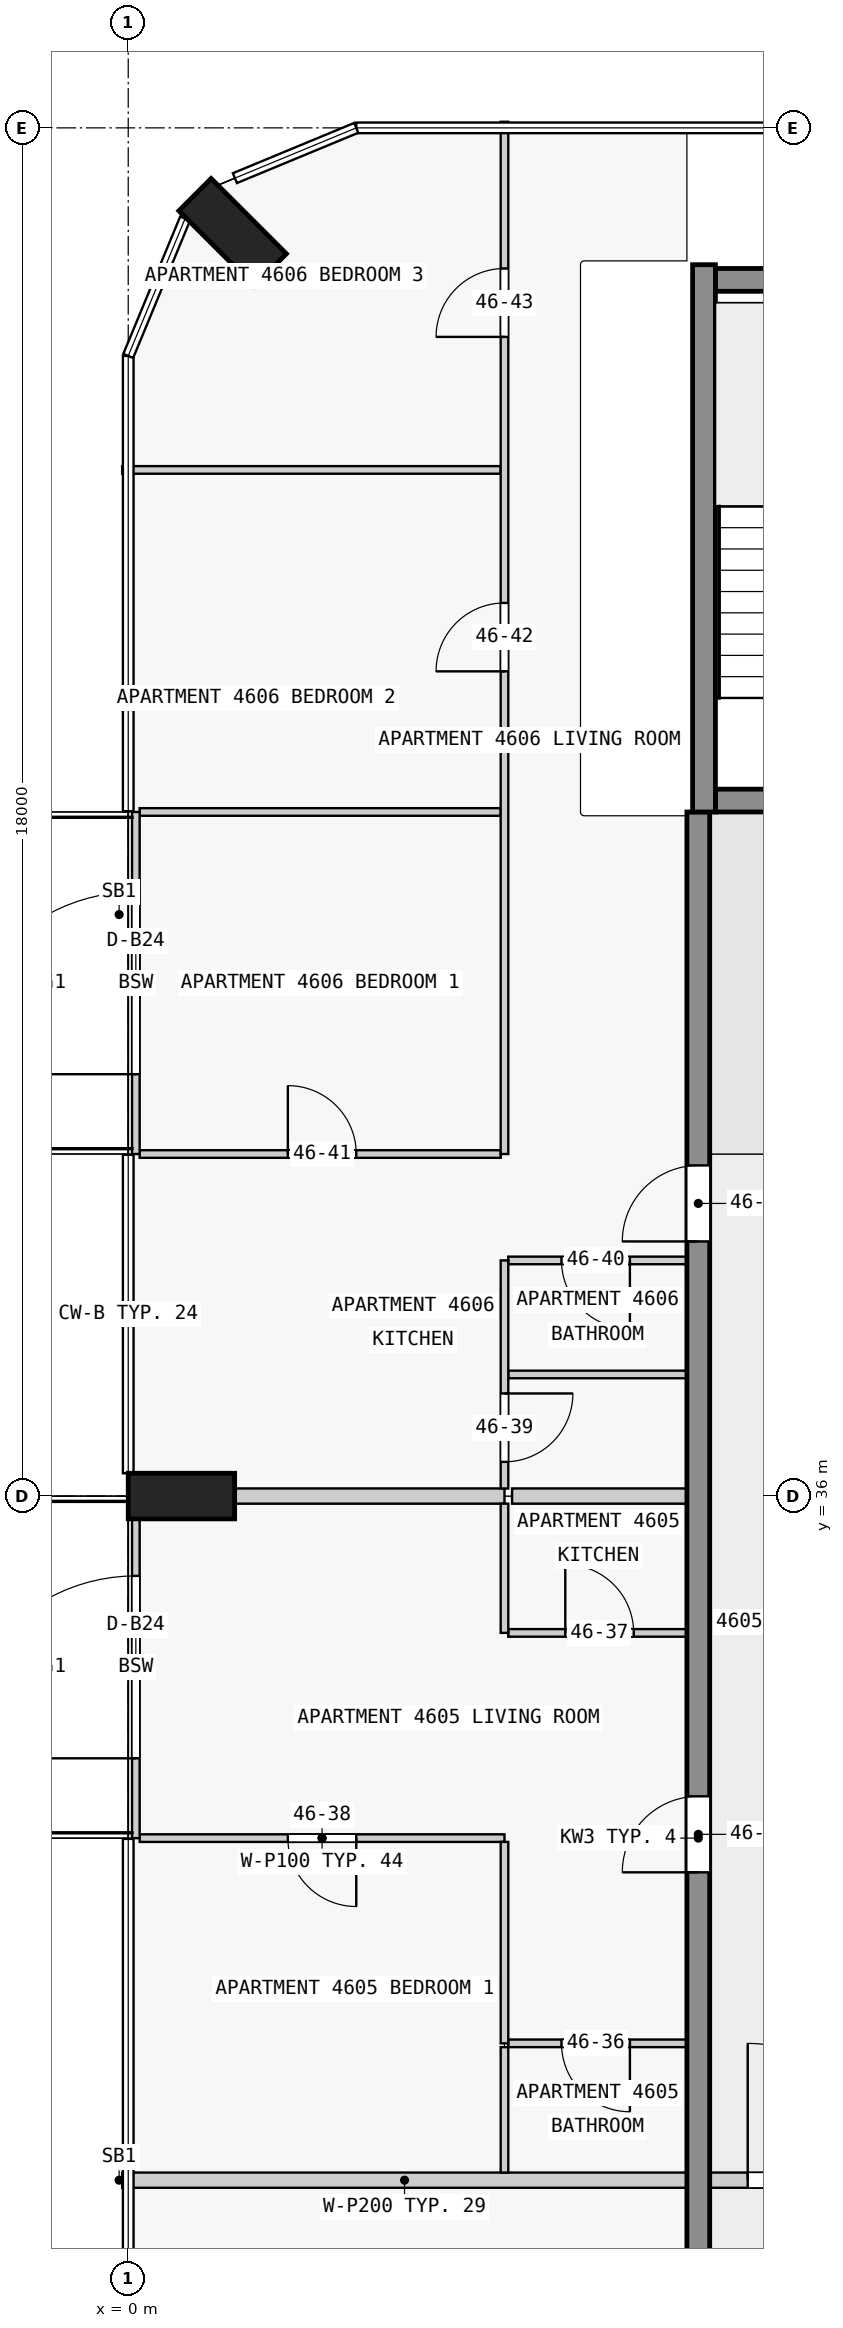
"""IFC4 building model, lengths in metres.
Left out: names, types, materials, properties, quantities, classifications, styles, units other than length and angle.
Written with IfcOpenShell. Run it as: python <this file> out.ifc"""

import sys

from ifc_helpers import new_model, si_unit, direction, frame, frame_2d, origin, origin_2d, place, context, subcontext, project, spatial, rectangle, extrude, element, fill, save


model = new_model("IFC4")
c1 = context("Model", 3, precision=1e-05, world=origin(), true_north=direction((0.0, 1.0)))
c2 = subcontext(c1, "Body", "Model", "MODEL_VIEW")
j1 = project(units=[si_unit("LENGTHUNIT", "METRE"), si_unit("PLANEANGLEUNIT", "RADIAN")], contexts=[c1])
p1 = place(None, origin())
s1 = spatial("IfcSite", under=j1, at=p1, CompositionType="ELEMENT")
p2 = place(p1, origin())
s2 = spatial("IfcBuilding", under=s1, at=p2, CompositionType="ELEMENT")
p3 = place(p2, frame((0.0, 0.0, 177.9)))
s3 = spatial("IfcBuildingStorey", under=s2, at=p3, CompositionType="ELEMENT", Elevation=177.9)
for number, where, z_axis, x_axis in (
    (1, (1.374, 52.626, 0.0), (0.0, 0.0, 1.0), (0.707, 0.707, 0.0)),
    (2, (0.7, 36.0, 0.0), (0.0, 0.0, 1.0), (0.0, 1.0, 0.0)),
):
    element("IfcColumn", number, at=place(p3, frame(where, z_axis=z_axis, x_axis=x_axis)), inside=s3, PredefinedType="COLUMN", context=c2, shape_type="SweptSolid", body=[
        extrude(rectangle(XDim=0.6, YDim=1.4, at=origin_2d()), origin(), (0.0, 0.0, 1.0), 3.5),
    ])
p4 = place(p3, frame((7.725, 45.15, 0.0), z_axis=(0.0, 0.0, 1.0), x_axis=(1.0, 0.0, 0.0)))
e3 = element("IfcWall", 3, at=p4, inside=s3, PredefinedType="SHEAR", context=c2, shape_type="SweptSolid", body=[
    extrude(rectangle(XDim=2.55, YDim=0.3, at=frame_2d((1.275, 0.0))), origin(), (0.0, 0.0, 1.0), 3.5),
])
p5 = place(p4, frame((0.725, 0.0, 0.0)))
e4 = element("IfcOpeningElement", 4, at=p5, cuts=e3, PredefinedType="OPENING", context=c2, shape_type="SweptSolid", body=[
    extrude(rectangle(XDim=1.1, YDim=2.1, at=frame_2d((0.55, 1.05))), frame((0.0, 0.16, 0.0), z_axis=(0.0, -1.0, 0.0), x_axis=(1.0, 0.0, 0.0)), (0.0, 0.0, 1.0), 0.32),
])
p6 = place(p3, frame((7.725, 52.0, 0.0), z_axis=(0.0, 0.0, 1.0), x_axis=(1.0, 0.0, 0.0)))
e5 = element("IfcWall", 5, at=p6, inside=s3, PredefinedType="SHEAR", context=c2, shape_type="SweptSolid", body=[
    extrude(rectangle(XDim=2.55, YDim=0.3, at=frame_2d((1.275, 0.0))), origin(), (0.0, 0.0, 1.0), 3.5),
])
p7 = place(p3, frame((7.575, 45.0, 0.0), z_axis=(0.0, 0.0, 1.0), x_axis=(0.0, 1.0, 0.0)))
e6 = element("IfcWall", 6, at=p7, inside=s3, PredefinedType="SHEAR", context=c2, shape_type="SweptSolid", body=[
    extrude(rectangle(XDim=7.2, YDim=0.3, at=frame_2d((3.6, 0.0))), origin(), (0.0, 0.0, 1.0), 3.5),
])
p8 = place(p3, frame((7.5, 18.0, 0.0), z_axis=(0.0, 0.0, 1.0), x_axis=(0.0, 1.0, 0.0)))
e7 = element("IfcWall", 7, at=p8, inside=s3, PredefinedType="SHEAR", context=c2, shape_type="SweptSolid", body=[
    extrude(rectangle(XDim=27.0, YDim=0.3, at=frame_2d((13.5, 0.0))), origin(), (0.0, 0.0, 1.0), 3.25),
])
p9 = place(p8, frame((1.75, 0.0, 0.0)))
e8 = element("IfcOpeningElement", 8, at=p9, cuts=e7, PredefinedType="OPENING", context=c2, shape_type="SweptSolid", body=[
    extrude(rectangle(XDim=1.0, YDim=2.1, at=frame_2d((0.5, 1.05))), frame((0.0, 0.16, 0.0), z_axis=(0.0, -1.0, 0.0), x_axis=(1.0, 0.0, 0.0)), (0.0, 0.0, 1.0), 0.32),
])
p10 = place(p8, frame((5.85, 0.0, 0.0)))
e9 = element("IfcOpeningElement", 9, at=p10, cuts=e7, PredefinedType="OPENING", context=c2, shape_type="SweptSolid", body=[
    extrude(rectangle(XDim=1.8, YDim=2.1, at=frame_2d((0.9, 1.05))), frame((0.0, 0.16, 0.0), z_axis=(0.0, -1.0, 0.0), x_axis=(1.0, 0.0, 0.0)), (0.0, 0.0, 1.0), 0.32),
])
p11 = place(p8, frame((13.05, 0.0, 0.0)))
e10 = element("IfcOpeningElement", 10, at=p11, cuts=e7, PredefinedType="OPENING", context=c2, shape_type="SweptSolid", body=[
    extrude(rectangle(XDim=1.0, YDim=2.1, at=frame_2d((0.5, 1.05))), frame((0.0, 0.16, 0.0), z_axis=(0.0, -1.0, 0.0), x_axis=(1.0, 0.0, 0.0)), (0.0, 0.0, 1.0), 0.32),
])
p12 = place(p8, frame((21.35, 0.0, 0.0)))
e11 = element("IfcOpeningElement", 11, at=p12, cuts=e7, PredefinedType="OPENING", context=c2, shape_type="SweptSolid", body=[
    extrude(rectangle(XDim=1.0, YDim=2.1, at=frame_2d((0.5, 1.05))), frame((0.0, 0.16, 0.0), z_axis=(0.0, -1.0, 0.0), x_axis=(1.0, 0.0, 0.0)), (0.0, 0.0, 1.0), 0.32),
])
p13 = place(p3, frame((0.1, 31.5, 0.0), z_axis=(0.0, 0.0, 1.0), x_axis=(0.0, 1.0, 0.0)))
e12 = element("IfcWall", 12, at=p13, inside=s3, PredefinedType="STANDARD", context=c2, shape_type="SweptSolid", body=[
    extrude(rectangle(XDim=4.5, YDim=0.1, at=frame_2d((2.25, 0.0))), origin(), (0.0, 0.0, 1.0), 3.25),
])
p14 = place(p13, frame((1.05, 0.0, 0.0)))
e13 = element("IfcOpeningElement", 13, at=p14, cuts=e12, PredefinedType="OPENING", context=c2, shape_type="SweptSolid", body=[
    extrude(rectangle(XDim=2.4, YDim=2.4, at=frame_2d((1.2, 1.2))), frame((0.0, 0.06, 0.0), z_axis=(0.0, -1.0, 0.0), x_axis=(1.0, 0.0, 0.0)), (0.0, 0.0, 1.0), 0.12),
])
p15 = place(p3, frame((0.1, 40.5, 0.0), z_axis=(0.0, 0.0, 1.0), x_axis=(0.0, 1.0, 0.0)))
e14 = element("IfcWall", 14, at=p15, inside=s3, PredefinedType="STANDARD", context=c2, shape_type="SweptSolid", body=[
    extrude(rectangle(XDim=4.5, YDim=0.1, at=frame_2d((2.25, 0.0))), origin(), (0.0, 0.0, 1.0), 3.25),
])
p16 = place(p15, frame((1.05, 0.0, 0.0)))
e15 = element("IfcOpeningElement", 15, at=p16, cuts=e14, PredefinedType="OPENING", context=c2, shape_type="SweptSolid", body=[
    extrude(rectangle(XDim=2.4, YDim=2.4, at=frame_2d((1.2, 1.2))), frame((0.0, 0.06, 0.0), z_axis=(0.0, -1.0, 0.0), x_axis=(1.0, 0.0, 0.0)), (0.0, 0.0, 1.0), 0.12),
])
p17 = place(p3, frame((7.35, 27.0, 0.0), z_axis=(0.0, 0.0, 1.0), x_axis=(-1.0, 0.0, 0.0)))
e16 = element("IfcWall", 16, at=p17, inside=s3, PredefinedType="PARTITIONING", context=c2, shape_type="SweptSolid", body=[
    extrude(rectangle(XDim=7.43, YDim=0.2, at=frame_2d((3.715, 0.0))), origin(), (0.0, 0.0, 1.0), 3.25),
])
p18 = place(p3, frame((7.35, 28.8, 0.0), z_axis=(0.0, 0.0, 1.0), x_axis=(-1.0, 0.0, 0.0)))
e17 = element("IfcWall", 17, at=p18, inside=s3, PredefinedType="PARTITIONING", context=c2, shape_type="SweptSolid", body=[
    extrude(rectangle(XDim=2.35, YDim=0.1, at=frame_2d((1.175, 0.0))), origin(), (0.0, 0.0, 1.0), 3.25),
])
p19 = place(p18, frame((0.75, 0.0, 0.0)))
e18 = element("IfcOpeningElement", 18, at=p19, cuts=e17, PredefinedType="OPENING", context=c2, shape_type="SweptSolid", body=[
    extrude(rectangle(XDim=0.9, YDim=2.1, at=frame_2d((0.45, 1.05))), frame((0.0, 0.06, 0.0), z_axis=(0.0, -1.0, 0.0), x_axis=(1.0, 0.0, 0.0)), (0.0, 0.0, 1.0), 0.12),
])
p20 = place(p3, frame((4.95, 31.5, 0.0), z_axis=(0.0, 0.0, 1.0), x_axis=(-1.0, 0.0, 0.0)))
e19 = element("IfcWall", 19, at=p20, inside=s3, PredefinedType="PARTITIONING", context=c2, shape_type="SweptSolid", body=[
    extrude(rectangle(XDim=4.8, YDim=0.1, at=frame_2d((2.4, 0.0))), origin(), (0.0, 0.0, 1.0), 3.25),
])
p21 = place(p20, frame((1.95, 0.0, 0.0)))
e20 = element("IfcOpeningElement", 20, at=p21, cuts=e19, PredefinedType="OPENING", context=c2, shape_type="SweptSolid", body=[
    extrude(rectangle(XDim=0.9, YDim=2.1, at=frame_2d((0.45, 1.05))), frame((0.0, 0.06, 0.0), z_axis=(0.0, -1.0, 0.0), x_axis=(1.0, 0.0, 0.0)), (0.0, 0.0, 1.0), 0.12),
])
p22 = place(p3, frame((5.0, 34.2, 0.0), z_axis=(0.0, 0.0, 1.0), x_axis=(1.0, 0.0, 0.0)))
e21 = element("IfcWall", 21, at=p22, inside=s3, PredefinedType="PARTITIONING", context=c2, shape_type="SweptSolid", body=[
    extrude(rectangle(XDim=2.35, YDim=0.1, at=frame_2d((1.175, 0.0))), origin(), (0.0, 0.0, 1.0), 3.25),
])
p23 = place(p22, frame((0.75, 0.0, 0.0)))
e22 = element("IfcOpeningElement", 22, at=p23, cuts=e21, PredefinedType="OPENING", context=c2, shape_type="SweptSolid", body=[
    extrude(rectangle(XDim=0.9, YDim=2.1, at=frame_2d((0.45, 1.05))), frame((0.0, 0.06, 0.0), z_axis=(0.0, -1.0, 0.0), x_axis=(1.0, 0.0, 0.0)), (0.0, 0.0, 1.0), 0.12),
])
p24 = place(p3, frame((7.35, 36.0, 0.0), z_axis=(0.0, 0.0, 1.0), x_axis=(-1.0, 0.0, 0.0)))
e23 = element("IfcWall", 23, at=p24, inside=s3, PredefinedType="PARTITIONING", context=c2, shape_type="SweptSolid", body=[
    extrude(rectangle(XDim=2.3, YDim=0.2, at=frame_2d((1.15, 0.0))), origin(), (0.0, 0.0, 1.0), 3.25),
])
p25 = place(p3, frame((1.4, 36.0, 0.0), z_axis=(0.0, 0.0, 1.0), x_axis=(1.0, 0.0, 0.0)))
e24 = element("IfcWall", 24, at=p25, inside=s3, PredefinedType="PARTITIONING", context=c2, shape_type="SweptSolid", body=[
    extrude(rectangle(XDim=3.55, YDim=0.2, at=frame_2d((1.775, 0.0))), origin(), (0.0, 0.0, 1.0), 3.25),
])
p26 = place(p3, frame((7.35, 37.6, 0.0), z_axis=(0.0, 0.0, 1.0), x_axis=(-1.0, 0.0, 0.0)))
e25 = element("IfcWall", 25, at=p26, inside=s3, PredefinedType="PARTITIONING", context=c2, shape_type="SweptSolid", body=[
    extrude(rectangle(XDim=2.35, YDim=0.1, at=frame_2d((1.175, 0.0))), origin(), (0.0, 0.0, 1.0), 3.25),
])
p27 = place(p3, frame((7.35, 39.1, 0.0), z_axis=(0.0, 0.0, 1.0), x_axis=(-1.0, 0.0, 0.0)))
e26 = element("IfcWall", 26, at=p27, inside=s3, PredefinedType="PARTITIONING", context=c2, shape_type="SweptSolid", body=[
    extrude(rectangle(XDim=2.35, YDim=0.1, at=frame_2d((1.175, 0.0))), origin(), (0.0, 0.0, 1.0), 3.25),
])
p28 = place(p27, frame((0.75, 0.0, 0.0)))
e27 = element("IfcOpeningElement", 27, at=p28, cuts=e26, PredefinedType="OPENING", context=c2, shape_type="SweptSolid", body=[
    extrude(rectangle(XDim=0.9, YDim=2.1, at=frame_2d((0.45, 1.05))), frame((0.0, 0.06, 0.0), z_axis=(0.0, -1.0, 0.0), x_axis=(1.0, 0.0, 0.0)), (0.0, 0.0, 1.0), 0.12),
])
p29 = place(p3, frame((0.15, 40.5, 0.0), z_axis=(0.0, 0.0, 1.0), x_axis=(1.0, 0.0, 0.0)))
e28 = element("IfcWall", 28, at=p29, inside=s3, PredefinedType="PARTITIONING", context=c2, shape_type="SweptSolid", body=[
    extrude(rectangle(XDim=4.75, YDim=0.1, at=frame_2d((2.375, 0.0))), origin(), (0.0, 0.0, 1.0), 3.25),
])
p30 = place(p29, frame((1.95, 0.0, 0.0)))
e29 = element("IfcOpeningElement", 29, at=p30, cuts=e28, PredefinedType="OPENING", context=c2, shape_type="SweptSolid", body=[
    extrude(rectangle(XDim=0.9, YDim=2.1, at=frame_2d((0.45, 1.05))), frame((0.0, 0.06, 0.0), z_axis=(0.0, -1.0, 0.0), x_axis=(1.0, 0.0, 0.0)), (0.0, 0.0, 1.0), 0.12),
])
p31 = place(p3, frame((4.9, 45.0, 0.0), z_axis=(0.0, 0.0, 1.0), x_axis=(-1.0, 0.0, 0.0)))
e30 = element("IfcWall", 30, at=p31, inside=s3, PredefinedType="PARTITIONING", context=c2, shape_type="SweptSolid", body=[
    extrude(rectangle(XDim=4.75, YDim=0.1, at=frame_2d((2.375, 0.0))), origin(), (0.0, 0.0, 1.0), 3.25),
])
p32 = place(p3, frame((4.9, 49.5, 0.0), z_axis=(0.0, 0.0, 1.0), x_axis=(-1.0, 0.0, 0.0)))
e31 = element("IfcWall", 31, at=p32, inside=s3, PredefinedType="PARTITIONING", context=c2, shape_type="SweptSolid", body=[
    extrude(rectangle(XDim=4.98, YDim=0.1, at=frame_2d((2.49, 0.0))), origin(), (0.0, 0.0, 1.0), 3.25),
])
p33 = place(p3, frame((4.95, 28.75, 0.0), z_axis=(0.0, 0.0, 1.0), x_axis=(0.0, -1.0, 0.0)))
e32 = element("IfcWall", 32, at=p33, inside=s3, PredefinedType="PARTITIONING", context=c2, shape_type="SweptSolid", body=[
    extrude(rectangle(XDim=1.65, YDim=0.1, at=frame_2d((0.825, 0.0))), origin(), (0.0, 0.0, 1.0), 3.25),
])
p34 = place(p3, frame((4.95, 35.9, 0.0), z_axis=(0.0, 0.0, 1.0), x_axis=(0.0, -1.0, 0.0)))
e33 = element("IfcWall", 33, at=p34, inside=s3, PredefinedType="PARTITIONING", context=c2, shape_type="SweptSolid", body=[
    extrude(rectangle(XDim=1.7, YDim=0.1, at=frame_2d((0.85, 0.0))), origin(), (0.0, 0.0, 1.0), 3.25),
])
p35 = place(p3, frame((4.95, 39.1, 0.0), z_axis=(0.0, 0.0, 1.0), x_axis=(0.0, -1.0, 0.0)))
e34 = element("IfcWall", 34, at=p35, inside=s3, PredefinedType="PARTITIONING", context=c2, shape_type="SweptSolid", body=[
    extrude(rectangle(XDim=3.0, YDim=0.1, at=frame_2d((1.5, 0.0))), origin(), (0.0, 0.0, 1.0), 3.25),
])
p36 = place(p35, frame((1.75, 0.0, 0.0)))
e35 = element("IfcOpeningElement", 35, at=p36, cuts=e34, PredefinedType="OPENING", context=c2, shape_type="SweptSolid", body=[
    extrude(rectangle(XDim=0.9, YDim=2.1, at=frame_2d((0.45, 1.05))), frame((0.0, 0.06, 0.0), z_axis=(0.0, -1.0, 0.0), x_axis=(1.0, 0.0, 0.0)), (0.0, 0.0, 1.0), 0.12),
])
p37 = place(p3, frame((4.95, 28.8, 0.0), z_axis=(0.0, 0.0, 1.0), x_axis=(0.0, 1.0, 0.0)))
e36 = element("IfcWall", 36, at=p37, inside=s3, PredefinedType="PARTITIONING", context=c2, shape_type="SweptSolid", body=[
    extrude(rectangle(XDim=2.65, YDim=0.1, at=frame_2d((1.325, 0.0))), origin(), (0.0, 0.0, 1.0), 3.25),
])
p38 = place(p3, frame((4.95, 40.5, 0.0), z_axis=(0.0, 0.0, 1.0), x_axis=(0.0, 1.0, 0.0)))
e37 = element("IfcWall", 37, at=p38, inside=s3, PredefinedType="PARTITIONING", context=c2, shape_type="SweptSolid", body=[
    extrude(rectangle(XDim=13.58, YDim=0.1, at=frame_2d((6.79, 0.0))), origin(), (0.0, 0.0, 1.0), 3.25),
])
p39 = place(p38, frame((6.35, 0.0, 0.0)))
e38 = element("IfcOpeningElement", 38, at=p39, cuts=e37, PredefinedType="OPENING", context=c2, shape_type="SweptSolid", body=[
    extrude(rectangle(XDim=0.9, YDim=2.1, at=frame_2d((0.45, 1.05))), frame((0.0, 0.06, 0.0), z_axis=(0.0, -1.0, 0.0), x_axis=(1.0, 0.0, 0.0)), (0.0, 0.0, 1.0), 0.12),
])
p40 = place(p38, frame((10.75, 0.0, 0.0)))
e39 = element("IfcOpeningElement", 39, at=p40, cuts=e37, PredefinedType="OPENING", context=c2, shape_type="SweptSolid", body=[
    extrude(rectangle(XDim=0.9, YDim=2.1, at=frame_2d((0.45, 1.05))), frame((0.0, 0.06, 0.0), z_axis=(0.0, -1.0, 0.0), x_axis=(1.0, 0.0, 0.0)), (0.0, 0.0, 1.0), 0.12),
])
p41 = place(p3, frame((7.45, 27.0, 0.0), z_axis=(0.0, 0.0, 1.0), x_axis=(1.0, 0.0, 0.0)))
e40 = element("IfcWall", 40, at=p41, inside=s3, PredefinedType="PARTITIONING", context=c2, shape_type="SweptSolid", body=[
    extrude(rectangle(XDim=3.2, YDim=0.2, at=frame_2d((1.6, 0.0))), origin(), (0.0, 0.0, 1.0), 3.25),
])
p42 = place(p41, frame((0.7, 0.0, 0.0)))
e41 = element("IfcOpeningElement", 41, at=p42, cuts=e40, PredefinedType="OPENING", context=c2, shape_type="SweptSolid", body=[
    extrude(rectangle(XDim=1.8, YDim=2.1, at=frame_2d((0.9, 1.05))), frame((0.0, 0.11, 0.0), z_axis=(0.0, -1.0, 0.0), x_axis=(1.0, 0.0, 0.0)), (0.0, 0.0, 1.0), 0.22),
])
p43 = place(p14, origin())
e42 = element("IfcDoor", 42, at=p43, inside=s3, OperationType="SINGLE_SWING_LEFT", PredefinedType="DOOR", context=c2, shape_type="SweptSolid", body=[
    extrude(rectangle(XDim=2.4, YDim=2.4, at=frame_2d((1.2, 1.2))), frame((0.0, 0.025, 0.0), z_axis=(0.0, -1.0, 0.0), x_axis=(1.0, 0.0, 0.0)), (0.0, 0.0, 1.0), 0.05),
])
fill(e13, e42)
p44 = place(p16, origin())
e43 = element("IfcDoor", 43, at=p44, inside=s3, OperationType="SINGLE_SWING_LEFT", PredefinedType="DOOR", context=c2, shape_type="SweptSolid", body=[
    extrude(rectangle(XDim=2.4, YDim=2.4, at=frame_2d((1.2, 1.2))), frame((0.0, 0.025, 0.0), z_axis=(0.0, -1.0, 0.0), x_axis=(1.0, 0.0, 0.0)), (0.0, 0.0, 1.0), 0.05),
])
fill(e15, e43)
p45 = place(p11, origin())
e44 = element("IfcDoor", 44, at=p45, inside=s3, OperationType="SINGLE_SWING_RIGHT", PredefinedType="DOOR", context=c2, shape_type="SweptSolid", body=[
    extrude(rectangle(XDim=1.0, YDim=2.1, at=frame_2d((0.5, 1.05))), frame((0.0, 0.025, 0.0), z_axis=(0.0, -1.0, 0.0), x_axis=(1.0, 0.0, 0.0)), (0.0, 0.0, 1.0), 0.05),
])
fill(e10, e44)
p46 = place(p12, origin())
e45 = element("IfcDoor", 45, at=p46, inside=s3, OperationType="SINGLE_SWING_RIGHT", PredefinedType="DOOR", context=c2, shape_type="SweptSolid", body=[
    extrude(rectangle(XDim=1.0, YDim=2.1, at=frame_2d((0.5, 1.05))), frame((0.0, 0.025, 0.0), z_axis=(0.0, -1.0, 0.0), x_axis=(1.0, 0.0, 0.0)), (0.0, 0.0, 1.0), 0.05),
])
fill(e11, e45)
p47 = place(p42, origin())
e46 = element("IfcDoor", 46, at=p47, inside=s3, OperationType="SINGLE_SWING_LEFT", PredefinedType="DOOR", context=c2, shape_type="SweptSolid", body=[
    extrude(rectangle(XDim=1.8, YDim=2.1, at=frame_2d((0.9, 1.05))), frame((0.0, 0.025, 0.0), z_axis=(0.0, -1.0, 0.0), x_axis=(1.0, 0.0, 0.0)), (0.0, 0.0, 1.0), 0.05),
])
fill(e41, e46)
p48 = place(p19, origin())
e47 = element("IfcDoor", 47, at=p48, inside=s3, OperationType="SINGLE_SWING_RIGHT", PredefinedType="DOOR", context=c2, shape_type="SweptSolid", body=[
    extrude(rectangle(XDim=0.9, YDim=2.1, at=frame_2d((0.45, 1.05))), frame((0.0, 0.025, 0.0), z_axis=(0.0, -1.0, 0.0), x_axis=(1.0, 0.0, 0.0)), (0.0, 0.0, 1.0), 0.05),
])
fill(e18, e47)
p49 = place(p23, origin())
e48 = element("IfcDoor", 48, at=p49, inside=s3, OperationType="SINGLE_SWING_RIGHT", PredefinedType="DOOR", context=c2, shape_type="SweptSolid", body=[
    extrude(rectangle(XDim=0.9, YDim=2.1, at=frame_2d((0.45, 1.05))), frame((0.0, 0.025, 0.0), z_axis=(0.0, -1.0, 0.0), x_axis=(1.0, 0.0, 0.0)), (0.0, 0.0, 1.0), 0.05),
])
fill(e22, e48)
p50 = place(p21, origin())
e49 = element("IfcDoor", 49, at=p50, inside=s3, OperationType="SINGLE_SWING_LEFT", PredefinedType="DOOR", context=c2, shape_type="SweptSolid", body=[
    extrude(rectangle(XDim=0.9, YDim=2.1, at=frame_2d((0.45, 1.05))), frame((0.0, 0.025, 0.0), z_axis=(0.0, -1.0, 0.0), x_axis=(1.0, 0.0, 0.0)), (0.0, 0.0, 1.0), 0.05),
])
fill(e20, e49)
p51 = place(p36, origin())
e50 = element("IfcDoor", 50, at=p51, inside=s3, OperationType="SINGLE_SWING_RIGHT", PredefinedType="DOOR", context=c2, shape_type="SweptSolid", body=[
    extrude(rectangle(XDim=0.9, YDim=2.1, at=frame_2d((0.45, 1.05))), frame((0.0, 0.025, 0.0), z_axis=(0.0, -1.0, 0.0), x_axis=(1.0, 0.0, 0.0)), (0.0, 0.0, 1.0), 0.05),
])
fill(e35, e50)
p52 = place(p28, origin())
e51 = element("IfcDoor", 51, at=p52, inside=s3, OperationType="SINGLE_SWING_RIGHT", PredefinedType="DOOR", context=c2, shape_type="SweptSolid", body=[
    extrude(rectangle(XDim=0.9, YDim=2.1, at=frame_2d((0.45, 1.05))), frame((0.0, 0.025, 0.0), z_axis=(0.0, -1.0, 0.0), x_axis=(1.0, 0.0, 0.0)), (0.0, 0.0, 1.0), 0.05),
])
fill(e27, e51)
p53 = place(p30, origin())
e52 = element("IfcDoor", 52, at=p53, inside=s3, OperationType="SINGLE_SWING_RIGHT", PredefinedType="DOOR", context=c2, shape_type="SweptSolid", body=[
    extrude(rectangle(XDim=0.9, YDim=2.1, at=frame_2d((0.45, 1.05))), frame((0.0, 0.025, 0.0), z_axis=(0.0, -1.0, 0.0), x_axis=(1.0, 0.0, 0.0)), (0.0, 0.0, 1.0), 0.05),
])
fill(e29, e52)
p54 = place(p39, origin())
e53 = element("IfcDoor", 53, at=p54, inside=s3, OperationType="SINGLE_SWING_RIGHT", PredefinedType="DOOR", context=c2, shape_type="SweptSolid", body=[
    extrude(rectangle(XDim=0.9, YDim=2.1, at=frame_2d((0.45, 1.05))), frame((0.0, 0.025, 0.0), z_axis=(0.0, -1.0, 0.0), x_axis=(1.0, 0.0, 0.0)), (0.0, 0.0, 1.0), 0.05),
])
fill(e38, e53)
p55 = place(p40, origin())
e54 = element("IfcDoor", 54, at=p55, inside=s3, OperationType="SINGLE_SWING_RIGHT", PredefinedType="DOOR", context=c2, shape_type="SweptSolid", body=[
    extrude(rectangle(XDim=0.9, YDim=2.1, at=frame_2d((0.45, 1.05))), frame((0.0, 0.025, 0.0), z_axis=(0.0, -1.0, 0.0), x_axis=(1.0, 0.0, 0.0)), (0.0, 0.0, 1.0), 0.05),
])
fill(e39, e54)
save(model, sys.argv[1])
